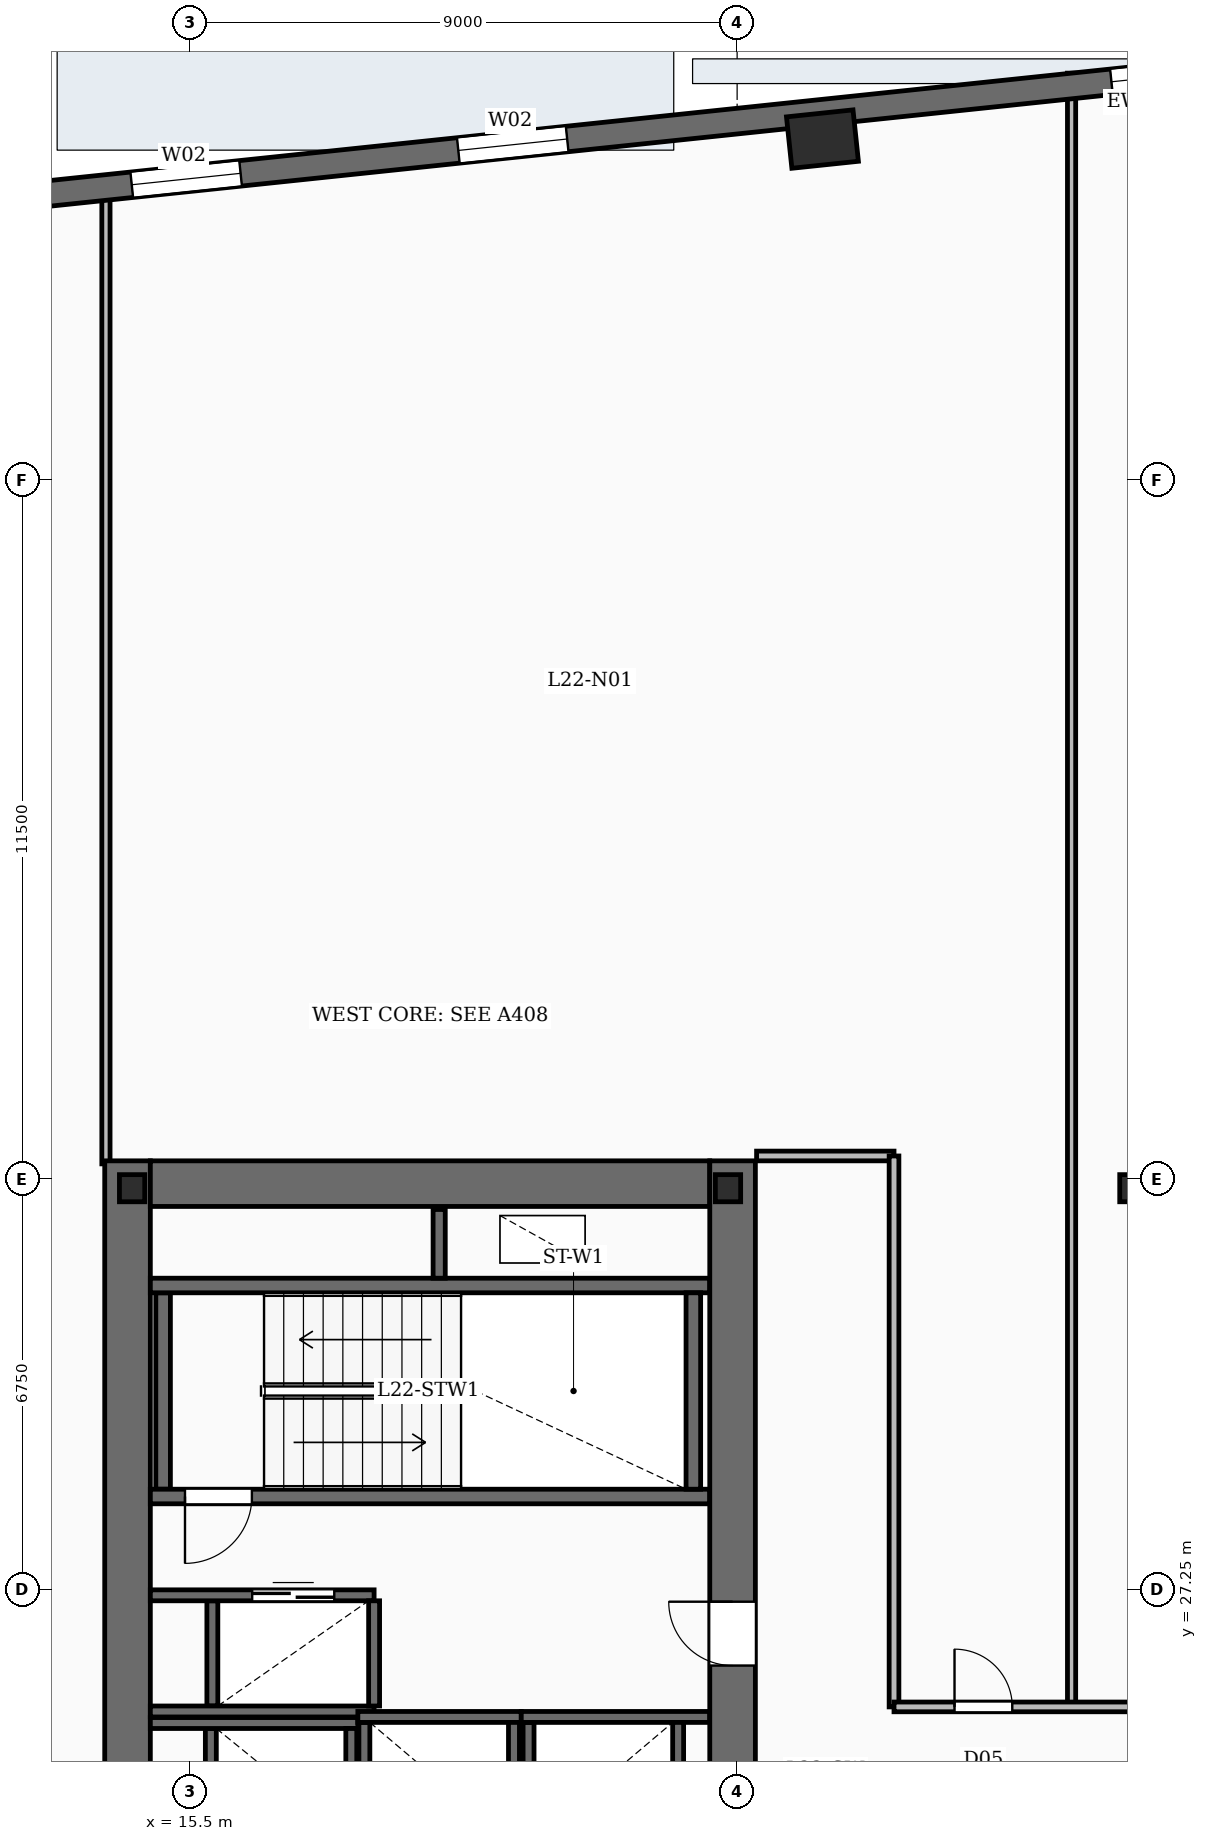
"""IFC4 building model, lengths in metres.
Left out: names, types, materials, properties, quantities, classifications, styles, units other than length and angle.
Written with IfcOpenShell. Run it as: python <this file> out.ifc"""

import sys

from ifc_helpers import new_model, si_unit, direction, frame, frame_2d, origin, origin_2d, place, context, subcontext, project, spatial, rectangle, i_section, extrude, element, fill, save


model = new_model("IFC4")
c1 = context("Model", 3, precision=1e-05, world=origin(), true_north=direction((0.0, 1.0)))
c2 = subcontext(c1, "Body", "Model", "MODEL_VIEW")
j1 = project(units=[si_unit("LENGTHUNIT", "METRE"), si_unit("PLANEANGLEUNIT", "RADIAN")], contexts=[c1])
p1 = place(None, origin())
s1 = spatial("IfcSite", under=j1, at=p1, CompositionType="ELEMENT")
p2 = place(p1, origin())
s2 = spatial("IfcBuilding", under=s1, at=p2, CompositionType="ELEMENT")
p3 = place(p2, frame((0.0, 0.0, 99.7)))
s3 = spatial("IfcBuildingStorey", under=s2, at=p3, CompositionType="ELEMENT", Elevation=99.7)
p4 = place(p3, frame((14.475, 19.0, -0.45), z_axis=(0.0, 0.0, 1.0), x_axis=(0.0, 1.0, 0.0)))
e1 = element("IfcWall", 1, at=p4, inside=s3, PredefinedType="SHEAR", context=c2, shape_type="SweptSolid", body=[
    extrude(rectangle(XDim=15.3, YDim=0.75, at=frame_2d((7.65, 0.0))), origin(), (0.0, 0.0, 1.0), 3.93),
])
p5 = place(p3, frame((24.425, 19.0, -0.45), z_axis=(0.0, 0.0, 1.0), x_axis=(0.0, 1.0, 0.0)))
e2 = element("IfcWall", 2, at=p5, inside=s3, PredefinedType="SHEAR", context=c2, shape_type="SweptSolid", body=[
    extrude(rectangle(XDim=15.3, YDim=0.75, at=frame_2d((7.65, 0.0))), origin(), (0.0, 0.0, 1.0), 3.93),
])
p6 = place(p5, frame((2.5, 0.0, 0.45)))
e3 = element("IfcOpeningElement", 3, at=p6, cuts=e2, PredefinedType="OPENING", context=c2, shape_type="SweptSolid", body=[
    extrude(rectangle(XDim=1.05, YDim=2.15, at=frame_2d((0.525, 1.075))), frame((0.0, 0.385, 0.0), z_axis=(0.0, -1.0, 0.0), x_axis=(1.0, 0.0, 0.0)), (0.0, 0.0, 1.0), 0.77),
])
p7 = place(p5, frame((7.0, 0.0, 0.45)))
e4 = element("IfcOpeningElement", 4, at=p7, cuts=e2, PredefinedType="OPENING", context=c2, shape_type="SweptSolid", body=[
    extrude(rectangle(XDim=1.05, YDim=2.15, at=frame_2d((0.525, 1.075))), frame((0.0, 0.385, 0.0), z_axis=(0.0, -1.0, 0.0), x_axis=(1.0, 0.0, 0.0)), (0.0, 0.0, 1.0), 0.77),
])
p8 = place(p3, frame((14.85, 33.925, -0.45), z_axis=(0.0, 0.0, 1.0), x_axis=(1.0, 0.0, 0.0)))
e5 = element("IfcWall", 5, at=p8, inside=s3, PredefinedType="SHEAR", context=c2, shape_type="SweptSolid", body=[
    extrude(rectangle(XDim=9.2, YDim=0.75, at=frame_2d((4.6, 0.0))), origin(), (0.0, 0.0, 1.0), 3.93),
])
for number, where, z_axis, x_axis in (
    (6, (14.55, 33.85, -0.45), (0.0, 0.0, 1.0), (1.0, 0.0, 0.0)),
    (7, (24.35, 33.85, -0.45), (0.0, 0.0, 1.0), (1.0, 0.0, 0.0)),
    (8, (31.0, 33.85, -0.45), (0.0, 0.0, 1.0), (1.0, 0.0, 0.0)),
):
    element("IfcColumn", number, at=place(p3, frame(where, z_axis=z_axis, x_axis=x_axis)), inside=s3, PredefinedType="COLUMN", context=c2, shape_type="SweptSolid", body=[
        extrude(i_section(OverallWidth=0.416, OverallDepth=0.446, WebThickness=0.039, FlangeThickness=0.063, FilletRadius=0.02, at=origin_2d()), origin(), (0.0, 0.0, 1.0), 3.93),
    ])
p9 = place(p3, frame((25.903, 51.103, -0.45), z_axis=(0.0, 0.0, 1.0), x_axis=(0.994521895368, 0.104528463268, 0.0)))
e9 = element("IfcColumn", 9, at=p9, inside=s3, PredefinedType="COLUMN", context=c2, shape_type="SweptSolid", body=[
    extrude(rectangle(XDim=1.1, YDim=0.85, at=origin_2d()), origin(), (0.0, 0.0, 1.0), 3.93),
])
p10 = place(p3, frame((11.958, 50.08, 0.0), z_axis=(0.0, 0.0, 1.0), x_axis=(0.994521823388, 0.104529148113, 0.0)))
e10 = element("IfcWall", 10, at=p10, inside=s3, PredefinedType="SOLIDWALL", context=c2, shape_type="SweptSolid", body=[
    extrude(rectangle(XDim=55.2, YDim=0.42, at=frame_2d((27.6, 0.0))), origin(), (0.0, 0.0, 1.0), 3.48),
])
p11 = place(p10, frame((2.6, 0.0, 0.88)))
e11 = element("IfcOpeningElement", 11, at=p11, cuts=e10, PredefinedType="OPENING", context=c2, shape_type="SweptSolid", body=[
    extrude(rectangle(XDim=1.8, YDim=2.15, at=frame_2d((0.9, 1.075))), frame((0.0, 0.22, 0.0), z_axis=(0.0, -1.0, 0.0), x_axis=(1.0, 0.0, 0.0)), (0.0, 0.0, 1.0), 0.44),
])
p12 = place(p10, frame((8.0, 0.0, 0.88)))
e12 = element("IfcOpeningElement", 12, at=p12, cuts=e10, PredefinedType="OPENING", context=c2, shape_type="SweptSolid", body=[
    extrude(rectangle(XDim=1.8, YDim=2.15, at=frame_2d((0.9, 1.075))), frame((0.0, 0.22, 0.0), z_axis=(0.0, -1.0, 0.0), x_axis=(1.0, 0.0, 0.0)), (0.0, 0.0, 1.0), 0.44),
])
p13 = place(p10, frame((18.8, 0.0, 0.88)))
e13 = element("IfcOpeningElement", 13, at=p13, cuts=e10, PredefinedType="OPENING", context=c2, shape_type="SweptSolid", body=[
    extrude(rectangle(XDim=1.8, YDim=2.15, at=frame_2d((0.9, 1.075))), frame((0.0, 0.22, 0.0), z_axis=(0.0, -1.0, 0.0), x_axis=(1.0, 0.0, 0.0)), (0.0, 0.0, 1.0), 0.44),
])
p14 = place(p10, frame((35.0, 0.0, 0.88)))
e14 = element("IfcOpeningElement", 14, at=p14, cuts=e10, PredefinedType="OPENING", context=c2, shape_type="SweptSolid", body=[
    extrude(rectangle(XDim=1.8, YDim=2.15, at=frame_2d((0.9, 1.075))), frame((0.0, 0.22, 0.0), z_axis=(0.0, -1.0, 0.0), x_axis=(1.0, 0.0, 0.0)), (0.0, 0.0, 1.0), 0.44),
])
p15 = place(p10, frame((45.8, 0.0, 0.88)))
e15 = element("IfcOpeningElement", 15, at=p15, cuts=e10, PredefinedType="OPENING", context=c2, shape_type="SweptSolid", body=[
    extrude(rectangle(XDim=1.8, YDim=2.15, at=frame_2d((0.9, 1.075))), frame((0.0, 0.22, 0.0), z_axis=(0.0, -1.0, 0.0), x_axis=(1.0, 0.0, 0.0)), (0.0, 0.0, 1.0), 0.44),
])
p16 = place(p3, frame((24.05, 28.78, 0.0), z_axis=(0.0, 0.0, 1.0), x_axis=(-1.0, 0.0, 0.0)))
e16 = element("IfcWall", 16, at=p16, inside=s3, PredefinedType="SOLIDWALL", context=c2, shape_type="SweptSolid", body=[
    extrude(rectangle(XDim=9.2, YDim=0.24, at=frame_2d((4.6, 0.0))), origin(), (0.0, 0.0, 1.0), 3.48),
])
p17 = place(p16, frame((7.53, 0.0, 0.0)))
e17 = element("IfcOpeningElement", 17, at=p17, cuts=e16, PredefinedType="OPENING", context=c2, shape_type="SweptSolid", body=[
    extrude(rectangle(XDim=1.1, YDim=2.15, at=frame_2d((0.55, 1.075))), frame((0.0, 0.13, 0.0), z_axis=(0.0, -1.0, 0.0), x_axis=(1.0, 0.0, 0.0)), (0.0, 0.0, 1.0), 0.26),
])
p18 = place(p3, frame((14.85, 32.25, 0.0), z_axis=(0.0, 0.0, 1.0), x_axis=(1.0, 0.0, 0.0)))
e18 = element("IfcWall", 18, at=p18, inside=s3, PredefinedType="SOLIDWALL", context=c2, shape_type="SweptSolid", body=[
    extrude(rectangle(XDim=9.2, YDim=0.24, at=frame_2d((4.6, 0.0))), origin(), (0.0, 0.0, 1.0), 3.48),
])
for number, where, z_axis, x_axis in (
    (19, (15.06, 28.9, 0.0), (0.0, 0.0, 1.0), (0.0, 1.0, 0.0)),
    (20, (23.78, 28.9, 0.0), (0.0, 0.0, 1.0), (0.0, 1.0, 0.0)),
):
    element("IfcWall", number, at=place(p3, frame(where, z_axis=z_axis, x_axis=x_axis)), inside=s3, PredefinedType="SOLIDWALL", context=c2, shape_type="SweptSolid", body=[
        extrude(rectangle(XDim=3.23, YDim=0.24, at=frame_2d((1.615, 0.0))), origin(), (0.0, 0.0, 1.0), 3.48),
    ])
p19 = place(p3, frame((19.6, 32.37, 0.0), z_axis=(0.0, 0.0, 1.0), x_axis=(0.0, 1.0, 0.0)))
e21 = element("IfcWall", 21, at=p19, inside=s3, PredefinedType="SOLIDWALL", context=c2, shape_type="SweptSolid", body=[
    extrude(rectangle(XDim=1.13, YDim=0.2, at=frame_2d((0.565, 0.0))), origin(), (0.0, 0.0, 1.0), 3.48),
])
p20 = place(p3, frame((14.85, 25.055, 0.0), z_axis=(0.0, 0.0, 1.0), x_axis=(1.0, 0.0, 0.0)))
e22 = element("IfcWall", 22, at=p20, inside=s3, PredefinedType="SOLIDWALL", context=c2, shape_type="SweptSolid", body=[
    extrude(rectangle(XDim=3.412, YDim=0.18, at=frame_2d((1.706, 0.0))), origin(), (0.0, 0.0, 1.0), 3.48),
])
for number, where, z_axis, x_axis in (
    (23, (15.845, 23.235, 0.0), (0.0, 0.0, 1.0), (0.0, 1.0, 0.0)),
    (24, (18.155, 23.235, 0.0), (0.0, 0.0, 1.0), (0.0, 1.0, 0.0)),
):
    element("IfcWall", number, at=place(p3, frame(where, z_axis=z_axis, x_axis=x_axis)), inside=s3, PredefinedType="SOLIDWALL", context=c2, shape_type="SweptSolid", body=[
        extrude(rectangle(XDim=1.73, YDim=0.18, at=frame_2d((0.865, 0.0))), origin(), (0.0, 0.0, 1.0), 3.48),
    ])
p21 = place(p3, frame((18.262, 25.155, 0.0), z_axis=(0.0, 0.0, 1.0), x_axis=(1.0, 0.0, 0.0)))
e25 = element("IfcWall", 25, at=p21, inside=s3, PredefinedType="SOLIDWALL", context=c2, shape_type="SweptSolid", body=[
    extrude(rectangle(XDim=2.688, YDim=0.18, at=frame_2d((1.344, 0.0))), origin(), (0.0, 0.0, 1.0), 3.48),
])
for number, where, z_axis, x_axis in (
    (26, (18.37, 23.135, 0.0), (0.0, 0.0, 1.0), (0.0, 1.0, 0.0)),
    (27, (20.83, 23.135, 0.0), (0.0, 0.0, 1.0), (0.0, 1.0, 0.0)),
):
    element("IfcWall", number, at=place(p3, frame(where, z_axis=z_axis, x_axis=x_axis)), inside=s3, PredefinedType="SOLIDWALL", context=c2, shape_type="SweptSolid", body=[
        extrude(rectangle(XDim=1.93, YDim=0.18, at=frame_2d((0.965, 0.0))), origin(), (0.0, 0.0, 1.0), 3.48),
    ])
p22 = place(p3, frame((20.95, 25.155, 0.0), z_axis=(0.0, 0.0, 1.0), x_axis=(1.0, 0.0, 0.0)))
e28 = element("IfcWall", 28, at=p22, inside=s3, PredefinedType="SOLIDWALL", context=c2, shape_type="SweptSolid", body=[
    extrude(rectangle(XDim=3.1, YDim=0.18, at=frame_2d((1.55, 0.0))), origin(), (0.0, 0.0, 1.0), 3.48),
])
for number, where, z_axis, x_axis in (
    (29, (21.07, 23.135, 0.0), (0.0, 0.0, 1.0), (0.0, 1.0, 0.0)),
    (30, (23.53, 23.135, 0.0), (0.0, 0.0, 1.0), (0.0, 1.0, 0.0)),
):
    element("IfcWall", number, at=place(p3, frame(where, z_axis=z_axis, x_axis=x_axis)), inside=s3, PredefinedType="SOLIDWALL", context=c2, shape_type="SweptSolid", body=[
        extrude(rectangle(XDim=1.93, YDim=0.18, at=frame_2d((0.965, 0.0))), origin(), (0.0, 0.0, 1.0), 3.48),
    ])
p23 = place(p3, frame((14.85, 27.155, 0.0), z_axis=(0.0, 0.0, 1.0), x_axis=(1.0, 0.0, 0.0)))
e31 = element("IfcWall", 31, at=p23, inside=s3, PredefinedType="SOLIDWALL", context=c2, shape_type="SweptSolid", body=[
    extrude(rectangle(XDim=3.68, YDim=0.18, at=frame_2d((1.84, 0.0))), origin(), (0.0, 0.0, 1.0), 3.48),
])
p24 = place(p23, frame((1.675, 0.0, 0.0)))
e32 = element("IfcOpeningElement", 32, at=p24, cuts=e31, PredefinedType="OPENING", context=c2, shape_type="SweptSolid", body=[
    extrude(rectangle(XDim=1.35, YDim=2.3, at=frame_2d((0.675, 1.15))), frame((0.0, 0.1, 0.0), z_axis=(0.0, -1.0, 0.0), x_axis=(1.0, 0.0, 0.0)), (0.0, 0.0, 1.0), 0.2),
])
p25 = place(p3, frame((14.85, 25.245, 0.0), z_axis=(0.0, 0.0, 1.0), x_axis=(1.0, 0.0, 0.0)))
e33 = element("IfcWall", 33, at=p25, inside=s3, PredefinedType="SOLIDWALL", context=c2, shape_type="SweptSolid", body=[
    extrude(rectangle(XDim=3.68, YDim=0.18, at=frame_2d((1.84, 0.0))), origin(), (0.0, 0.0, 1.0), 3.48),
])
for number, where, z_axis, x_axis in (
    (34, (15.87, 25.335, 0.0), (0.0, 0.0, 1.0), (0.0, 1.0, 0.0)),
    (35, (18.53, 25.335, 0.0), (0.0, 0.0, 1.0), (0.0, 1.0, 0.0)),
):
    element("IfcWall", number, at=place(p3, frame(where, z_axis=z_axis, x_axis=x_axis)), inside=s3, PredefinedType="SOLIDWALL", context=c2, shape_type="SweptSolid", body=[
        extrude(rectangle(XDim=1.73, YDim=0.18, at=frame_2d((0.865, 0.0))), origin(), (0.0, 0.0, 1.0), 3.48),
    ])
p26 = place(p3, frame((30.0, 25.32, 0.0), z_axis=(0.0, 0.0, 1.0), x_axis=(0.0, 1.0, 0.0)))
e36 = element("IfcWall", 36, at=p26, inside=s3, PredefinedType="PARTITIONING", context=c2, shape_type="SweptSolid", body=[
    extrude(rectangle(XDim=26.867, YDim=0.135, at=frame_2d((13.434, 0.0))), origin(), (0.0, 0.0, 1.0), 2.54),
])
p27 = place(p3, frame((14.12, 34.25, 0.0), z_axis=(0.0, 0.0, 1.0), x_axis=(0.0, 1.0, 0.0)))
e37 = element("IfcWall", 37, at=p27, inside=s3, PredefinedType="PARTITIONING", context=c2, shape_type="SweptSolid", body=[
    extrude(rectangle(XDim=16.027, YDim=0.135, at=frame_2d((8.013, 0.0))), origin(), (0.0, 0.0, 1.0), 2.54),
])
p28 = place(p3, frame((27.08, 25.32, 0.0), z_axis=(0.0, 0.0, 1.0), x_axis=(1.0, 0.0, 0.0)))
e38 = element("IfcWall", 38, at=p28, inside=s3, PredefinedType="PARTITIONING", context=c2, shape_type="SweptSolid", body=[
    extrude(rectangle(XDim=20.74, YDim=0.16, at=frame_2d((10.37, 0.0))), origin(), (0.0, 0.0, 1.0), 2.54),
])
p29 = place(p28, frame((0.995, 0.0, 0.0)))
e39 = element("IfcOpeningElement", 39, at=p29, cuts=e38, PredefinedType="OPENING", context=c2, shape_type="SweptSolid", body=[
    extrude(rectangle(XDim=0.95, YDim=2.15, at=frame_2d((0.475, 1.075))), frame((0.0, 0.09, 0.0), z_axis=(0.0, -1.0, 0.0), x_axis=(1.0, 0.0, 0.0)), (0.0, 0.0, 1.0), 0.18),
])
p30 = place(p28, frame((5.445, 0.0, 0.0)))
e40 = element("IfcOpeningElement", 40, at=p30, cuts=e38, PredefinedType="OPENING", context=c2, shape_type="SweptSolid", body=[
    extrude(rectangle(XDim=0.95, YDim=2.15, at=frame_2d((0.475, 1.075))), frame((0.0, 0.09, 0.0), z_axis=(0.0, -1.0, 0.0), x_axis=(1.0, 0.0, 0.0)), (0.0, 0.0, 1.0), 0.18),
])
p31 = place(p28, frame((11.695, 0.0, 0.0)))
e41 = element("IfcOpeningElement", 41, at=p31, cuts=e38, PredefinedType="OPENING", context=c2, shape_type="SweptSolid", body=[
    extrude(rectangle(XDim=0.95, YDim=2.15, at=frame_2d((0.475, 1.075))), frame((0.0, 0.09, 0.0), z_axis=(0.0, -1.0, 0.0), x_axis=(1.0, 0.0, 0.0)), (0.0, 0.0, 1.0), 0.18),
])
p32 = place(p28, frame((18.295, 0.0, 0.0)))
e42 = element("IfcOpeningElement", 42, at=p32, cuts=e38, PredefinedType="OPENING", context=c2, shape_type="SweptSolid", body=[
    extrude(rectangle(XDim=0.95, YDim=2.15, at=frame_2d((0.475, 1.075))), frame((0.0, 0.09, 0.0), z_axis=(0.0, -1.0, 0.0), x_axis=(1.0, 0.0, 0.0)), (0.0, 0.0, 1.0), 0.18),
])
p33 = place(p3, frame((27.08, 25.32, 0.0), z_axis=(0.0, 0.0, 1.0), x_axis=(0.0, 1.0, 0.0)))
e43 = element("IfcWall", 43, at=p33, inside=s3, PredefinedType="PARTITIONING", context=c2, shape_type="SweptSolid", body=[
    extrude(rectangle(XDim=9.06, YDim=0.16, at=frame_2d((4.53, 0.0))), origin(), (0.0, 0.0, 1.0), 2.54),
])
p34 = place(p3, frame((24.82, 34.38, 0.0), z_axis=(0.0, 0.0, 1.0), x_axis=(1.0, 0.0, 0.0)))
e44 = element("IfcWall", 44, at=p34, inside=s3, PredefinedType="PARTITIONING", context=c2, shape_type="SweptSolid", body=[
    extrude(rectangle(XDim=2.26, YDim=0.16, at=frame_2d((1.13, 0.0))), origin(), (0.0, 0.0, 1.0), 2.54),
])
p35 = place(p11, origin())
e45 = element("IfcWindow", 45, at=p35, inside=s3, PartitioningType="DOUBLE_PANEL_VERTICAL", PredefinedType="WINDOW", context=c2, shape_type="SweptSolid", body=[
    extrude(rectangle(XDim=1.8, YDim=2.15, at=frame_2d((0.9, 1.075))), frame((0.0, 0.03, 0.0), z_axis=(0.0, -1.0, 0.0), x_axis=(1.0, 0.0, 0.0)), (0.0, 0.0, 1.0), 0.06),
])
fill(e11, e45)
p36 = place(p12, origin())
e46 = element("IfcWindow", 46, at=p36, inside=s3, PartitioningType="DOUBLE_PANEL_VERTICAL", PredefinedType="WINDOW", context=c2, shape_type="SweptSolid", body=[
    extrude(rectangle(XDim=1.8, YDim=2.15, at=frame_2d((0.9, 1.075))), frame((0.0, 0.03, 0.0), z_axis=(0.0, -1.0, 0.0), x_axis=(1.0, 0.0, 0.0)), (0.0, 0.0, 1.0), 0.06),
])
fill(e12, e46)
p37 = place(p13, origin())
e47 = element("IfcWindow", 47, at=p37, inside=s3, PartitioningType="DOUBLE_PANEL_VERTICAL", PredefinedType="WINDOW", context=c2, shape_type="SweptSolid", body=[
    extrude(rectangle(XDim=1.8, YDim=2.15, at=frame_2d((0.9, 1.075))), frame((0.0, 0.03, 0.0), z_axis=(0.0, -1.0, 0.0), x_axis=(1.0, 0.0, 0.0)), (0.0, 0.0, 1.0), 0.06),
])
fill(e13, e47)
p38 = place(p7, origin())
e48 = element("IfcDoor", 48, at=p38, inside=s3, OperationType="SINGLE_SWING_RIGHT", PredefinedType="DOOR", context=c2, shape_type="SweptSolid", body=[
    extrude(rectangle(XDim=1.05, YDim=2.15, at=frame_2d((0.525, 1.075))), frame((0.0, 0.025, 0.0), z_axis=(0.0, -1.0, 0.0), x_axis=(1.0, 0.0, 0.0)), (0.0, 0.0, 1.0), 0.05),
])
fill(e4, e48)
p39 = place(p17, origin())
e49 = element("IfcDoor", 49, at=p39, inside=s3, OperationType="SINGLE_SWING_RIGHT", PredefinedType="DOOR", context=c2, shape_type="SweptSolid", body=[
    extrude(rectangle(XDim=1.1, YDim=2.15, at=frame_2d((0.55, 1.075))), frame((0.0, 0.025, 0.0), z_axis=(0.0, -1.0, 0.0), x_axis=(1.0, 0.0, 0.0)), (0.0, 0.0, 1.0), 0.05),
])
fill(e17, e49)
p40 = place(p24, origin())
e50 = element("IfcDoor", 50, at=p40, inside=s3, OperationType="DOUBLE_DOOR_SLIDING", PredefinedType="DOOR", context=c2, shape_type="SweptSolid", body=[
    extrude(rectangle(XDim=1.35, YDim=2.3, at=frame_2d((0.675, 1.15))), frame((0.0, 0.025, 0.0), z_axis=(0.0, -1.0, 0.0), x_axis=(1.0, 0.0, 0.0)), (0.0, 0.0, 1.0), 0.05),
])
fill(e32, e50)
p41 = place(p29, origin())
e51 = element("IfcDoor", 51, at=p41, inside=s3, OperationType="SINGLE_SWING_LEFT", PredefinedType="DOOR", context=c2, shape_type="SweptSolid", body=[
    extrude(rectangle(XDim=0.95, YDim=2.15, at=frame_2d((0.475, 1.075))), frame((0.0, 0.025, 0.0), z_axis=(0.0, -1.0, 0.0), x_axis=(1.0, 0.0, 0.0)), (0.0, 0.0, 1.0), 0.05),
])
fill(e39, e51)
save(model, sys.argv[1])
